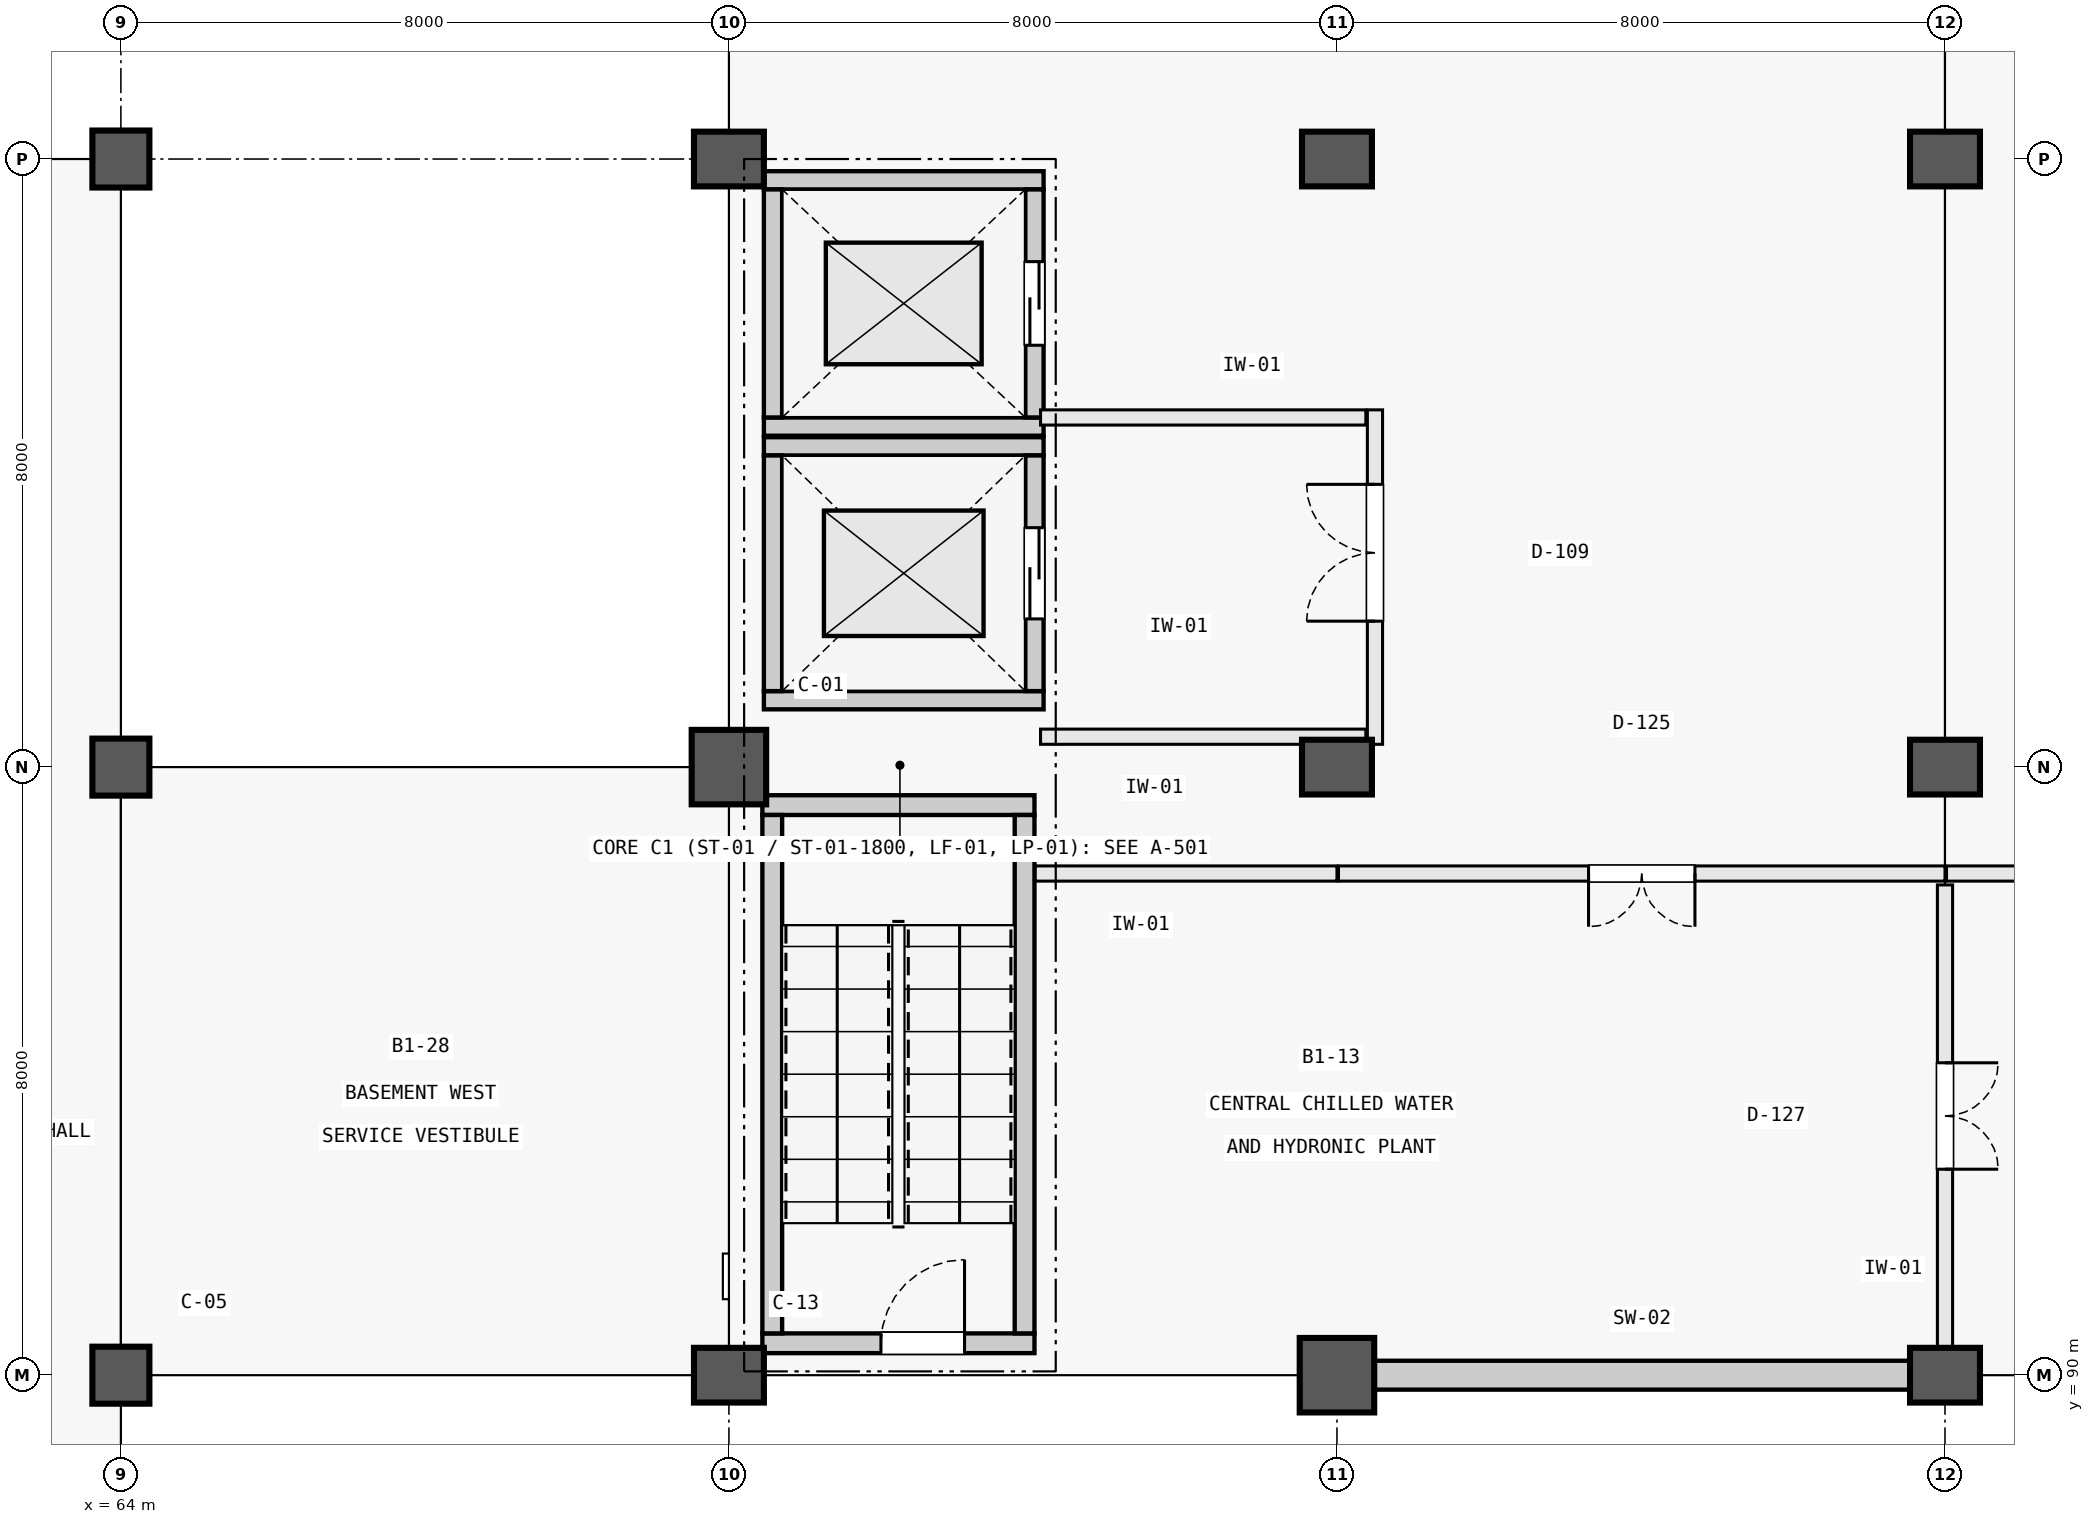
"""IFC4 building model, lengths in metres.
Left out: names, types, materials, properties, quantities, classifications, styles, units other than length and angle.
Written with IfcOpenShell. Run it as: python <this file> out.ifc"""

import sys

from ifc_helpers import new_model, si_unit, direction, frame, frame_2d, origin, origin_2d, place, context, subcontext, project, spatial, rectangle, extrude, element, fill, save


model = new_model("IFC4")
c1 = context("Model", 3, precision=1e-05, world=origin(), true_north=direction((0.0, 1.0)))
c2 = subcontext(c1, "Body", "Model", "MODEL_VIEW")
j1 = project(units=[si_unit("LENGTHUNIT", "METRE"), si_unit("PLANEANGLEUNIT", "RADIAN")], contexts=[c1])
p1 = place(None, origin())
s1 = spatial("IfcSite", under=j1, at=p1, CompositionType="ELEMENT")
p2 = place(p1, origin())
s2 = spatial("IfcBuilding", under=s1, at=p2, CompositionType="ELEMENT")
p3 = place(p2, frame((0.0, 0.0, -5.4)))
s3 = spatial("IfcBuildingStorey", under=s2, at=p3, CompositionType="ELEMENT", Elevation=-5.4)
for number, where, z_axis, x_axis in (
    (1, (64.0, 90.0, 0.0), (0.0, 0.0, 1.0), (1.0, 0.0, 0.0)),
    (2, (64.0, 98.0, 0.0), (0.0, 0.0, 1.0), (1.0, 0.0, 0.0)),
    (3, (64.0, 106.0, 0.0), (0.0, 0.0, 1.0), (1.0, 0.0, 0.0)),
):
    element("IfcColumn", number, at=place(p3, frame(where, z_axis=z_axis, x_axis=x_axis)), inside=s3, PredefinedType="COLUMN", context=c2, shape_type="SweptSolid", body=[
        extrude(rectangle(XDim=0.75, YDim=0.75, at=origin_2d()), origin(), (0.0, 0.0, 1.0), 5.4),
    ])
p4 = place(p3, frame((72.0, 90.0, 0.0), z_axis=(0.0, 0.0, 1.0), x_axis=(1.0, 0.0, 0.0)))
e4 = element("IfcColumn", 4, at=p4, inside=s3, PredefinedType="COLUMN", context=c2, shape_type="SweptSolid", body=[
    extrude(rectangle(XDim=0.92, YDim=0.72, at=origin_2d()), origin(), (0.0, 0.0, 1.0), 5.4),
])
p5 = place(p3, frame((72.0, 98.0, 0.0), z_axis=(0.0, 0.0, 1.0), x_axis=(1.0, 0.0, 0.0)))
e5 = element("IfcColumn", 5, at=p5, inside=s3, PredefinedType="COLUMN", context=c2, shape_type="SweptSolid", body=[
    extrude(rectangle(XDim=0.98, YDim=0.98, at=origin_2d()), origin(), (0.0, 0.0, 1.0), 5.4),
])
p6 = place(p3, frame((72.0, 106.0, 0.0), z_axis=(0.0, 0.0, 1.0), x_axis=(1.0, 0.0, 0.0)))
e6 = element("IfcColumn", 6, at=p6, inside=s3, PredefinedType="COLUMN", context=c2, shape_type="SweptSolid", body=[
    extrude(rectangle(XDim=0.92, YDim=0.72, at=origin_2d()), origin(), (0.0, 0.0, 1.0), 5.4),
])
p7 = place(p3, frame((80.0, 90.0, 0.0), z_axis=(0.0, 0.0, 1.0), x_axis=(1.0, 0.0, 0.0)))
e7 = element("IfcColumn", 7, at=p7, inside=s3, PredefinedType="COLUMN", context=c2, shape_type="SweptSolid", body=[
    extrude(rectangle(XDim=0.98, YDim=0.98, at=origin_2d()), origin(), (0.0, 0.0, 1.0), 5.4),
])
for number, where, z_axis, x_axis in (
    (8, (80.0, 98.0, 0.0), (0.0, 0.0, 1.0), (1.0, 0.0, 0.0)),
    (9, (80.0, 106.0, 0.0), (0.0, 0.0, 1.0), (1.0, 0.0, 0.0)),
    (10, (88.0, 90.0, 0.0), (0.0, 0.0, 1.0), (1.0, 0.0, 0.0)),
    (11, (88.0, 98.0, 0.0), (0.0, 0.0, 1.0), (1.0, 0.0, 0.0)),
    (12, (88.0, 106.0, 0.0), (0.0, 0.0, 1.0), (1.0, 0.0, 0.0)),
):
    element("IfcColumn", number, at=place(p3, frame(where, z_axis=z_axis, x_axis=x_axis)), inside=s3, PredefinedType="COLUMN", context=c2, shape_type="SweptSolid", body=[
        extrude(rectangle(XDim=0.92, YDim=0.72, at=origin_2d()), origin(), (0.0, 0.0, 1.0), 5.4),
    ])
p8 = place(p3, frame((80.49, 90.0, 0.0), z_axis=(0.0, 0.0, 1.0), x_axis=(1.0, 0.0, 0.0)))
e13 = element("IfcWall", 13, at=p8, inside=s3, PredefinedType="SHEAR", context=c2, shape_type="SweptSolid", body=[
    extrude(rectangle(XDim=7.05, YDim=0.38, at=frame_2d((3.525, 0.0))), origin(), (0.0, 0.0, 1.0), 4.98),
])
p9 = place(p3, frame((72.44, 90.42, 0.0), z_axis=(0.0, 0.0, 1.0), x_axis=(1.0, 0.0, 0.0)))
e14 = element("IfcWall", 14, at=p9, inside=s3, PredefinedType="SOLIDWALL", context=c2, shape_type="SweptSolid", body=[
    extrude(rectangle(XDim=3.58, YDim=0.26, at=frame_2d((1.79, 0.0))), origin(), (0.0, 0.0, 1.0), 5.4),
])
p10 = place(p9, frame((1.56, 0.0, 0.0)))
e15 = element("IfcOpeningElement", 15, at=p10, cuts=e14, PredefinedType="OPENING", context=c2, shape_type="SweptSolid", body=[
    extrude(rectangle(XDim=1.1, YDim=2.2, at=frame_2d((0.55, 1.1))), frame((0.0, 0.142, 0.0), z_axis=(0.0, -1.0, 0.0), x_axis=(1.0, 0.0, 0.0)), (0.0, 0.0, 1.0), 0.284),
])
p11 = place(p3, frame((72.44, 97.5, 0.0), z_axis=(0.0, 0.0, 1.0), x_axis=(1.0, 0.0, 0.0)))
e16 = element("IfcWall", 16, at=p11, inside=s3, PredefinedType="SOLIDWALL", context=c2, shape_type="SweptSolid", body=[
    extrude(rectangle(XDim=3.58, YDim=0.26, at=frame_2d((1.79, 0.0))), origin(), (0.0, 0.0, 1.0), 5.4),
])
for number, where, z_axis, x_axis in (
    (17, (72.57, 90.55, 0.0), (0.0, 0.0, 1.0), (0.0, 1.0, 0.0)),
    (18, (75.89, 90.55, 0.0), (0.0, 0.0, 1.0), (0.0, 1.0, 0.0)),
):
    element("IfcWall", number, at=place(p3, frame(where, z_axis=z_axis, x_axis=x_axis)), inside=s3, PredefinedType="SOLIDWALL", context=c2, shape_type="SweptSolid", body=[
        extrude(rectangle(XDim=6.82, YDim=0.26, at=frame_2d((3.41, 0.0))), origin(), (0.0, 0.0, 1.0), 5.4),
    ])
for number, where, z_axis, x_axis in (
    (19, (72.46, 98.88, 0.0), (0.0, 0.0, 1.0), (1.0, 0.0, 0.0)),
    (20, (72.46, 102.22, 0.0), (0.0, 0.0, 1.0), (1.0, 0.0, 0.0)),
):
    element("IfcWall", number, at=place(p3, frame(where, z_axis=z_axis, x_axis=x_axis)), inside=s3, PredefinedType="SOLIDWALL", context=c2, shape_type="SweptSolid", body=[
        extrude(rectangle(XDim=3.68, YDim=0.24, at=frame_2d((1.84, 0.0))), origin(), (0.0, 0.0, 1.0), 5.4),
    ])
p12 = place(p3, frame((72.58, 99.0, 0.0), z_axis=(0.0, 0.0, 1.0), x_axis=(0.0, 1.0, 0.0)))
e21 = element("IfcWall", 21, at=p12, inside=s3, PredefinedType="SOLIDWALL", context=c2, shape_type="SweptSolid", body=[
    extrude(rectangle(XDim=3.1, YDim=0.24, at=frame_2d((1.55, 0.0))), origin(), (0.0, 0.0, 1.0), 5.4),
])
p13 = place(p3, frame((76.02, 99.0, 0.0), z_axis=(0.0, 0.0, 1.0), x_axis=(0.0, 1.0, 0.0)))
e22 = element("IfcWall", 22, at=p13, inside=s3, PredefinedType="SOLIDWALL", context=c2, shape_type="SweptSolid", body=[
    extrude(rectangle(XDim=3.1, YDim=0.24, at=frame_2d((1.55, 0.0))), origin(), (0.0, 0.0, 1.0), 5.4),
])
p14 = place(p13, frame((0.95, 0.0, 0.0)))
e23 = element("IfcOpeningElement", 23, at=p14, cuts=e22, PredefinedType="OPENING", context=c2, shape_type="SweptSolid", body=[
    extrude(rectangle(XDim=1.2, YDim=2.2, at=frame_2d((0.6, 1.1))), frame((0.0, 0.132, 0.0), z_axis=(0.0, -1.0, 0.0), x_axis=(1.0, 0.0, 0.0)), (0.0, 0.0, 1.0), 0.264),
])
for number, where, z_axis, x_axis in (
    (24, (72.46, 102.48, 0.0), (0.0, 0.0, 1.0), (1.0, 0.0, 0.0)),
    (25, (72.46, 105.72, 0.0), (0.0, 0.0, 1.0), (1.0, 0.0, 0.0)),
):
    element("IfcWall", number, at=place(p3, frame(where, z_axis=z_axis, x_axis=x_axis)), inside=s3, PredefinedType="SOLIDWALL", context=c2, shape_type="SweptSolid", body=[
        extrude(rectangle(XDim=3.68, YDim=0.24, at=frame_2d((1.84, 0.0))), origin(), (0.0, 0.0, 1.0), 5.4),
    ])
p15 = place(p3, frame((72.58, 102.6, 0.0), z_axis=(0.0, 0.0, 1.0), x_axis=(0.0, 1.0, 0.0)))
e26 = element("IfcWall", 26, at=p15, inside=s3, PredefinedType="SOLIDWALL", context=c2, shape_type="SweptSolid", body=[
    extrude(rectangle(XDim=3.0, YDim=0.24, at=frame_2d((1.5, 0.0))), origin(), (0.0, 0.0, 1.0), 5.4),
])
p16 = place(p3, frame((76.02, 102.6, 0.0), z_axis=(0.0, 0.0, 1.0), x_axis=(0.0, 1.0, 0.0)))
e27 = element("IfcWall", 27, at=p16, inside=s3, PredefinedType="SOLIDWALL", context=c2, shape_type="SweptSolid", body=[
    extrude(rectangle(XDim=3.0, YDim=0.24, at=frame_2d((1.5, 0.0))), origin(), (0.0, 0.0, 1.0), 5.4),
])
p17 = place(p16, frame((0.95, 0.0, 0.0)))
e28 = element("IfcOpeningElement", 28, at=p17, cuts=e27, PredefinedType="OPENING", context=c2, shape_type="SweptSolid", body=[
    extrude(rectangle(XDim=1.1, YDim=2.2, at=frame_2d((0.55, 1.1))), frame((0.0, 0.132, 0.0), z_axis=(0.0, -1.0, 0.0), x_axis=(1.0, 0.0, 0.0)), (0.0, 0.0, 1.0), 0.264),
])
for number, where, z_axis, x_axis in (
    (29, (76.1, 98.4, 0.0), (0.0, 0.0, 1.0), (1.0, 0.0, 0.0)),
    (30, (76.1, 102.6, 0.0), (0.0, 0.0, 1.0), (1.0, 0.0, 0.0)),
):
    element("IfcWall", number, at=place(p3, frame(where, z_axis=z_axis, x_axis=x_axis)), inside=s3, PredefinedType="PARTITIONING", context=c2, shape_type="SweptSolid", body=[
        extrude(rectangle(XDim=4.28, YDim=0.2, at=frame_2d((2.14, 0.0))), origin(), (0.0, 0.0, 1.0), 4.0),
    ])
p18 = place(p3, frame((80.5, 98.3, 0.0), z_axis=(0.0, 0.0, 1.0), x_axis=(0.0, 1.0, 0.0)))
e31 = element("IfcWall", 31, at=p18, inside=s3, PredefinedType="PARTITIONING", context=c2, shape_type="SweptSolid", body=[
    extrude(rectangle(XDim=4.4, YDim=0.2, at=frame_2d((2.2, 0.0))), origin(), (0.0, 0.0, 1.0), 4.0),
])
p19 = place(p18, frame((1.62, 0.0, 0.0)))
e32 = element("IfcOpeningElement", 32, at=p19, cuts=e31, PredefinedType="OPENING", context=c2, shape_type="SweptSolid", body=[
    extrude(rectangle(XDim=1.8, YDim=2.25, at=frame_2d((0.9, 1.125))), frame((0.0, 0.112, 0.0), z_axis=(0.0, -1.0, 0.0), x_axis=(1.0, 0.0, 0.0)), (0.0, 0.0, 1.0), 0.224),
])
p20 = place(p3, frame((76.03, 96.6, 0.0), z_axis=(0.0, 0.0, 1.0), x_axis=(1.0, 0.0, 0.0)))
e33 = element("IfcWall", 33, at=p20, inside=s3, PredefinedType="PARTITIONING", context=c2, shape_type="SweptSolid", body=[
    extrude(rectangle(XDim=3.97, YDim=0.2, at=frame_2d((1.985, 0.0))), origin(), (0.0, 0.0, 1.0), 3.83),
])
p21 = place(p3, frame((80.02, 96.6, 0.0), z_axis=(0.0, 0.0, 1.0), x_axis=(1.0, 0.0, 0.0)))
e34 = element("IfcWall", 34, at=p21, inside=s3, PredefinedType="PARTITIONING", context=c2, shape_type="SweptSolid", body=[
    extrude(rectangle(XDim=7.98, YDim=0.2, at=frame_2d((3.99, 0.0))), origin(), (0.0, 0.0, 1.0), 3.83),
])
p22 = place(p21, frame((3.29, 0.0, 0.0)))
e35 = element("IfcOpeningElement", 35, at=p22, cuts=e34, PredefinedType="OPENING", context=c2, shape_type="SweptSolid", body=[
    extrude(rectangle(XDim=1.4, YDim=2.2, at=frame_2d((0.7, 1.1))), frame((0.0, 0.112, 0.0), z_axis=(0.0, -1.0, 0.0), x_axis=(1.0, 0.0, 0.0)), (0.0, 0.0, 1.0), 0.224),
])
p23 = place(p3, frame((88.02, 96.6, 0.0), z_axis=(0.0, 0.0, 1.0), x_axis=(1.0, 0.0, 0.0)))
e36 = element("IfcWall", 36, at=p23, inside=s3, PredefinedType="PARTITIONING", context=c2, shape_type="SweptSolid", body=[
    extrude(rectangle(XDim=7.98, YDim=0.2, at=frame_2d((3.99, 0.0))), origin(), (0.0, 0.0, 1.0), 3.83),
])
p24 = place(p23, frame((3.39, 0.0, 0.0)))
e37 = element("IfcOpeningElement", 37, at=p24, cuts=e36, PredefinedType="OPENING", context=c2, shape_type="SweptSolid", body=[
    extrude(rectangle(XDim=1.2, YDim=2.25, at=frame_2d((0.6, 1.125))), frame((0.0, 0.112, 0.0), z_axis=(0.0, -1.0, 0.0), x_axis=(1.0, 0.0, 0.0)), (0.0, 0.0, 1.0), 0.224),
])
p25 = place(p3, frame((88.0, 90.37, 0.0), z_axis=(0.0, 0.0, 1.0), x_axis=(0.0, 1.0, 0.0)))
e38 = element("IfcWall", 38, at=p25, inside=s3, PredefinedType="PARTITIONING", context=c2, shape_type="SweptSolid", body=[
    extrude(rectangle(XDim=6.08, YDim=0.2, at=frame_2d((3.04, 0.0))), origin(), (0.0, 0.0, 1.0), 3.83),
])
p26 = place(p25, frame((2.34, 0.0, 0.0)))
e39 = element("IfcOpeningElement", 39, at=p26, cuts=e38, PredefinedType="OPENING", context=c2, shape_type="SweptSolid", body=[
    extrude(rectangle(XDim=1.4, YDim=2.2, at=frame_2d((0.7, 1.1))), frame((0.0, 0.112, 0.0), z_axis=(0.0, -1.0, 0.0), x_axis=(1.0, 0.0, 0.0)), (0.0, 0.0, 1.0), 0.224),
])
p27 = place(p10, origin())
e40 = element("IfcDoor", 40, at=p27, inside=s3, OperationType="SINGLE_SWING_RIGHT", PredefinedType="DOOR", context=c2, shape_type="SweptSolid", body=[
    extrude(rectangle(XDim=1.1, YDim=2.2, at=frame_2d((0.55, 1.1))), frame((0.0, 0.025, 0.0), z_axis=(0.0, -1.0, 0.0), x_axis=(1.0, 0.0, 0.0)), (0.0, 0.0, 1.0), 0.05),
])
fill(e15, e40)
p28 = place(p14, origin())
e41 = element("IfcDoor", 41, at=p28, inside=s3, OperationType="DOUBLE_DOOR_SLIDING", PredefinedType="DOOR", context=c2, shape_type="SweptSolid", body=[
    extrude(rectangle(XDim=1.2, YDim=2.2, at=frame_2d((0.6, 1.1))), frame((0.0, 0.025, 0.0), z_axis=(0.0, -1.0, 0.0), x_axis=(1.0, 0.0, 0.0)), (0.0, 0.0, 1.0), 0.05),
])
fill(e23, e41)
p29 = place(p17, origin())
e42 = element("IfcDoor", 42, at=p29, inside=s3, OperationType="DOUBLE_DOOR_SLIDING", PredefinedType="DOOR", context=c2, shape_type="SweptSolid", body=[
    extrude(rectangle(XDim=1.1, YDim=2.2, at=frame_2d((0.55, 1.1))), frame((0.0, 0.025, 0.0), z_axis=(0.0, -1.0, 0.0), x_axis=(1.0, 0.0, 0.0)), (0.0, 0.0, 1.0), 0.05),
])
fill(e28, e42)
p30 = place(p19, origin())
e43 = element("IfcDoor", 43, at=p30, inside=s3, OperationType="DOUBLE_DOOR_SINGLE_SWING", PredefinedType="DOOR", context=c2, shape_type="SweptSolid", body=[
    extrude(rectangle(XDim=1.8, YDim=2.25, at=frame_2d((0.9, 1.125))), frame((0.0, 0.025, 0.0), z_axis=(0.0, -1.0, 0.0), x_axis=(1.0, 0.0, 0.0)), (0.0, 0.0, 1.0), 0.05),
])
fill(e32, e43)
p31 = place(p22, frame((1.4, 0.0, 0.0), z_axis=(0.0, 0.0, 1.0), x_axis=(-1.0, 0.0, 0.0)))
e44 = element("IfcDoor", 44, at=p31, inside=s3, OperationType="DOUBLE_DOOR_SINGLE_SWING", PredefinedType="DOOR", context=c2, shape_type="SweptSolid", body=[
    extrude(rectangle(XDim=1.4, YDim=2.2, at=frame_2d((0.7, 1.1))), frame((0.0, 0.025, 0.0), z_axis=(0.0, -1.0, 0.0), x_axis=(1.0, 0.0, 0.0)), (0.0, 0.0, 1.0), 0.05),
])
fill(e35, e44)
p32 = place(p26, frame((1.4, 0.0, 0.0), z_axis=(0.0, 0.0, 1.0), x_axis=(-1.0, 0.0, 0.0)))
e45 = element("IfcDoor", 45, at=p32, inside=s3, OperationType="DOUBLE_DOOR_SINGLE_SWING", PredefinedType="DOOR", context=c2, shape_type="SweptSolid", body=[
    extrude(rectangle(XDim=1.4, YDim=2.2, at=frame_2d((0.7, 1.1))), frame((0.0, 0.025, 0.0), z_axis=(0.0, -1.0, 0.0), x_axis=(1.0, 0.0, 0.0)), (0.0, 0.0, 1.0), 0.05),
])
fill(e39, e45)
save(model, sys.argv[1])
